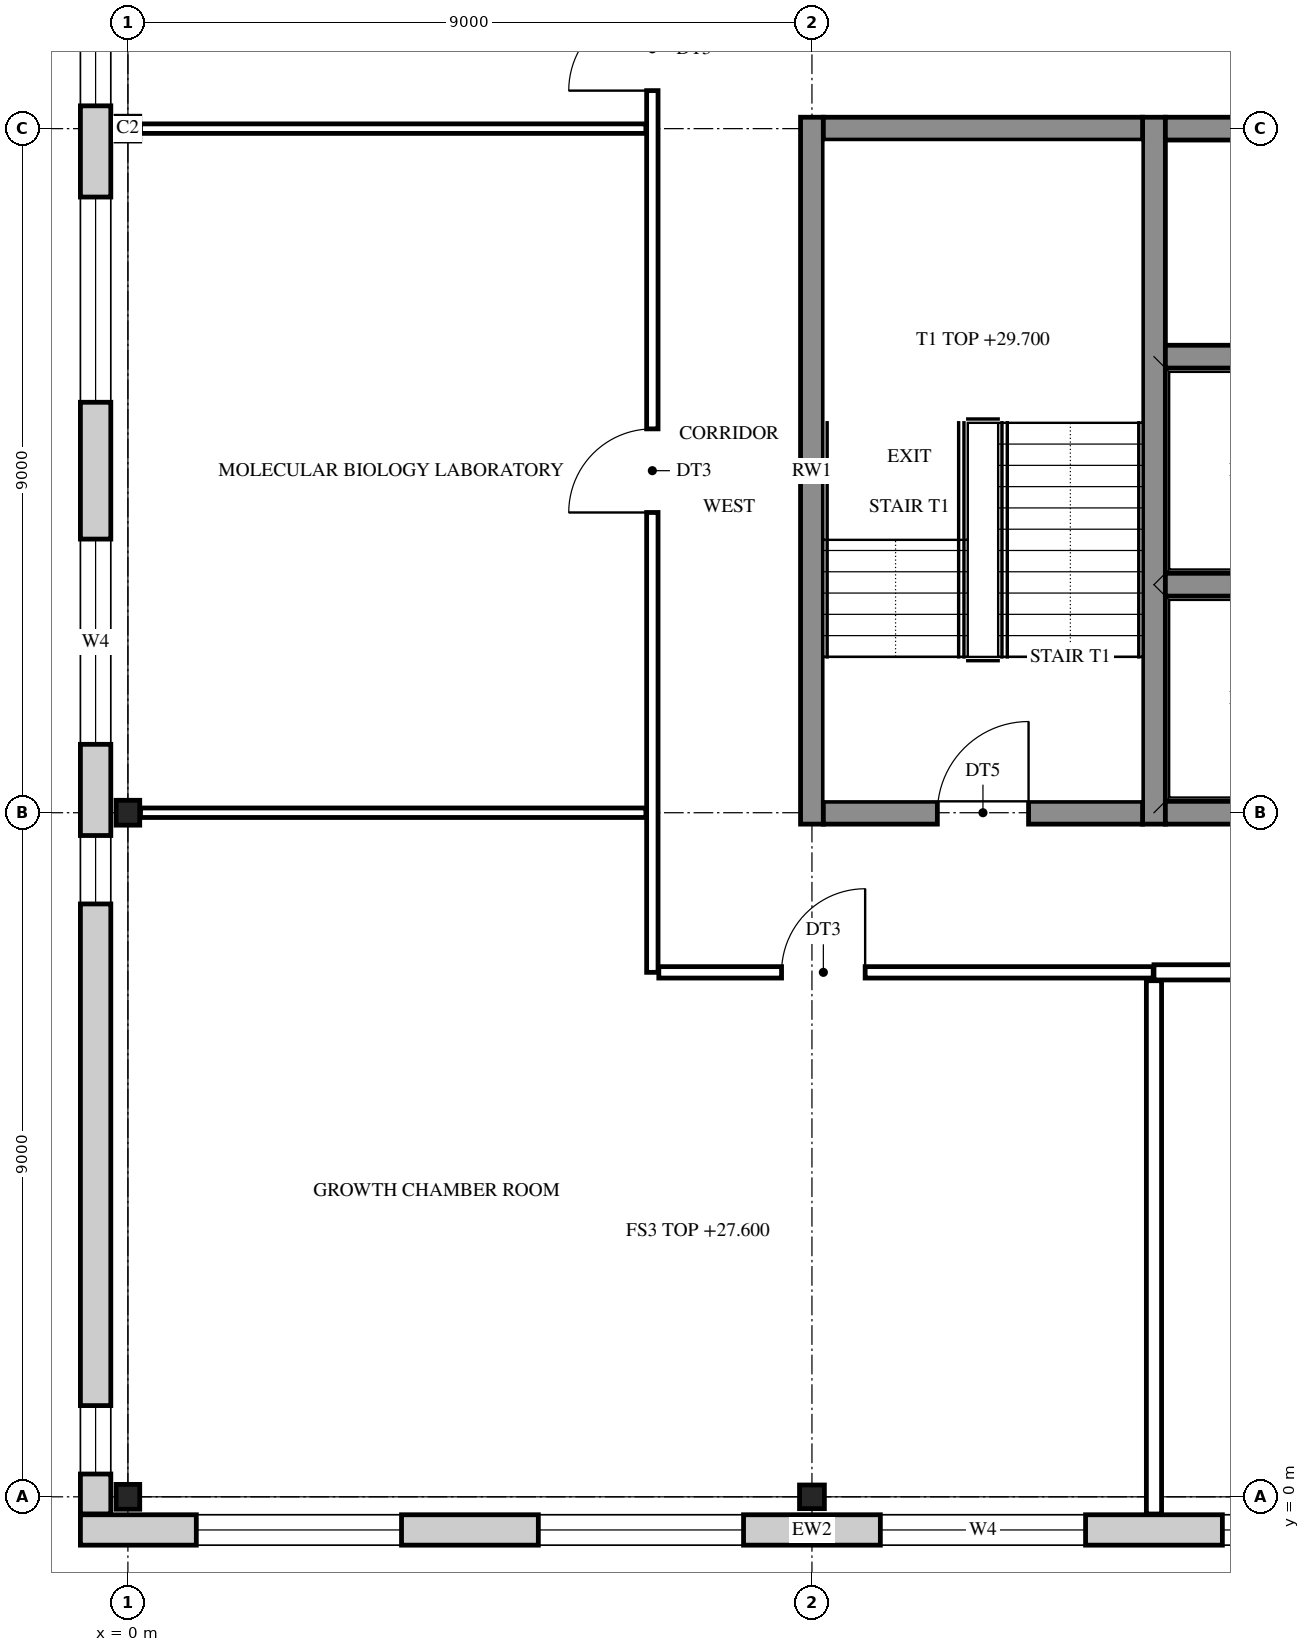
"""IFC4 building model, lengths in metres.
Left out: names, types, materials, properties, quantities, classifications, styles, units other than length and angle.
Written with IfcOpenShell. Run it as: python <this file> out.ifc"""

import sys

from ifc_helpers import new_model, si_unit, direction, frame, frame_2d, origin, origin_2d, place, context, subcontext, project, spatial, rectangle, i_section, extrude, element, fill, save


model = new_model("IFC4")
c1 = context("Model", 3, precision=1e-05, world=origin(), true_north=direction((0.0, 1.0)))
c2 = subcontext(c1, "Body", "Model", "MODEL_VIEW")
j1 = project(units=[si_unit("LENGTHUNIT", "METRE"), si_unit("PLANEANGLEUNIT", "RADIAN")], contexts=[c1])
p1 = place(None, origin())
s1 = spatial("IfcSite", under=j1, at=p1, CompositionType="ELEMENT")
p2 = place(p1, origin())
s2 = spatial("IfcBuilding", under=s1, at=p2, CompositionType="ELEMENT")
p3 = place(p2, frame((0.0, 0.0, 27.6)))
s3 = spatial("IfcBuildingStorey", under=s2, at=p3, CompositionType="ELEMENT", Elevation=27.6)
for number, where, z_axis, x_axis in (
    (1, (0.0, 0.0, 0.0), (0.0, 0.0, 1.0), (1.0, 0.0, 0.0)),
    (2, (0.0, 9.0, 0.0), (0.0, 0.0, 1.0), (1.0, 0.0, 0.0)),
    (3, (0.0, 18.0, 0.0), (0.0, 0.0, 1.0), (1.0, 0.0, 0.0)),
    (4, (9.0, 0.0, 0.0), (0.0, 0.0, 1.0), (0.0, 1.0, 0.0)),
):
    element("IfcColumn", number, at=place(p3, frame(where, z_axis=z_axis, x_axis=x_axis)), inside=s3, PredefinedType="COLUMN", context=c2, shape_type="SweptSolid", body=[
        extrude(i_section(OverallWidth=0.311, OverallDepth=0.327, WebThickness=0.016, FlangeThickness=0.025, FilletRadius=0.017, at=origin_2d()), origin(), (0.0, 0.0, 1.0), 4.2),
    ])
for number, where, z_axis, x_axis in (
    (5, (9.0, 8.85, 0.0), (0.0, 0.0, 1.0), (0.0, 1.0, 0.0)),
    (6, (13.5, 8.85, 0.0), (0.0, 0.0, 1.0), (0.0, 1.0, 0.0)),
):
    element("IfcWall", number, at=place(p3, frame(where, z_axis=z_axis, x_axis=x_axis)), inside=s3, PredefinedType="SHEAR", context=c2, shape_type="SweptSolid", body=[
        extrude(rectangle(XDim=9.3, YDim=0.3, at=frame_2d((4.65, 0.0))), origin(), (0.0, 0.0, 1.0), 4.2),
    ])
p4 = place(p3, frame((9.15, 9.0, 0.0), z_axis=(0.0, 0.0, 1.0), x_axis=(1.0, 0.0, 0.0)))
e7 = element("IfcWall", 7, at=p4, inside=s3, PredefinedType="SHEAR", context=c2, shape_type="SweptSolid", body=[
    extrude(rectangle(XDim=4.2, YDim=0.3, at=frame_2d((2.1, 0.0))), origin(), (0.0, 0.0, 1.0), 4.2),
])
p5 = place(p4, frame((1.5, 0.0, 0.0)))
e8 = element("IfcOpeningElement", 8, at=p5, cuts=e7, PredefinedType="OPENING", context=c2, shape_type="SweptSolid", body=[
    extrude(rectangle(XDim=1.2, YDim=2.1, at=frame_2d((0.6, 1.05))), frame((0.0, 0.16, 0.0), z_axis=(0.0, -1.0, 0.0), x_axis=(1.0, 0.0, 0.0)), (0.0, 0.0, 1.0), 0.32),
])
for number, where, z_axis, x_axis in (
    (9, (13.65, 9.0, 0.0), (0.0, 0.0, 1.0), (1.0, 0.0, 0.0)),
    (10, (13.65, 12.0, 0.0), (0.0, 0.0, 1.0), (1.0, 0.0, 0.0)),
    (11, (13.65, 15.0, 0.0), (0.0, 0.0, 1.0), (1.0, 0.0, 0.0)),
):
    element("IfcWall", number, at=place(p3, frame(where, z_axis=z_axis, x_axis=x_axis)), inside=s3, PredefinedType="SHEAR", context=c2, shape_type="SweptSolid", body=[
        extrude(rectangle(XDim=2.7, YDim=0.3, at=frame_2d((1.35, 0.0))), origin(), (0.0, 0.0, 1.0), 4.2),
    ])
p6 = place(p3, frame((9.15, 18.0, 0.0), z_axis=(0.0, 0.0, 1.0), x_axis=(1.0, 0.0, 0.0)))
e12 = element("IfcWall", 12, at=p6, inside=s3, PredefinedType="SHEAR", context=c2, shape_type="SweptSolid", body=[
    extrude(rectangle(XDim=4.2, YDim=0.3, at=frame_2d((2.1, 0.0))), origin(), (0.0, 0.0, 1.0), 4.2),
])
p7 = place(p3, frame((13.65, 18.0, 0.0), z_axis=(0.0, 0.0, 1.0), x_axis=(1.0, 0.0, 0.0)))
e13 = element("IfcWall", 13, at=p7, inside=s3, PredefinedType="SHEAR", context=c2, shape_type="SweptSolid", body=[
    extrude(rectangle(XDim=2.7, YDim=0.3, at=frame_2d((1.35, 0.0))), origin(), (0.0, 0.0, 1.0), 4.2),
])
p8 = place(p3, frame((32.125, -0.436, 0.0), z_axis=(0.0, 0.0, 1.0), x_axis=(-1.0, 0.0, 0.0)))
e14 = element("IfcWall", 14, at=p8, inside=s3, PredefinedType="STANDARD", context=c2, shape_type="SweptSolid", body=[
    extrude(rectangle(XDim=32.75, YDim=0.4, at=frame_2d((16.375, 0.0))), origin(), (0.0, 0.0, 1.0), 4.2),
])
p9 = place(p8, frame((28.525, 0.0, 0.9)))
e15 = element("IfcOpeningElement", 15, at=p9, cuts=e14, PredefinedType="OPENING", context=c2, shape_type="SweptSolid", body=[
    extrude(rectangle(XDim=2.7, YDim=2.5, at=frame_2d((1.35, 1.25))), frame((0.0, 0.21, 0.0), z_axis=(0.0, -1.0, 0.0), x_axis=(1.0, 0.0, 0.0)), (0.0, 0.0, 1.0), 0.42),
])
p10 = place(p8, frame((24.025, 0.0, 0.9)))
e16 = element("IfcOpeningElement", 16, at=p10, cuts=e14, PredefinedType="OPENING", context=c2, shape_type="SweptSolid", body=[
    extrude(rectangle(XDim=2.7, YDim=2.5, at=frame_2d((1.35, 1.25))), frame((0.0, 0.21, 0.0), z_axis=(0.0, -1.0, 0.0), x_axis=(1.0, 0.0, 0.0)), (0.0, 0.0, 1.0), 0.42),
])
p11 = place(p8, frame((19.525, 0.0, 0.9)))
e17 = element("IfcOpeningElement", 17, at=p11, cuts=e14, PredefinedType="OPENING", context=c2, shape_type="SweptSolid", body=[
    extrude(rectangle(XDim=2.7, YDim=2.5, at=frame_2d((1.35, 1.25))), frame((0.0, 0.21, 0.0), z_axis=(0.0, -1.0, 0.0), x_axis=(1.0, 0.0, 0.0)), (0.0, 0.0, 1.0), 0.42),
])
p12 = place(p8, frame((15.025, 0.0, 0.9)))
e18 = element("IfcOpeningElement", 18, at=p12, cuts=e14, PredefinedType="OPENING", context=c2, shape_type="SweptSolid", body=[
    extrude(rectangle(XDim=2.7, YDim=2.5, at=frame_2d((1.35, 1.25))), frame((0.0, 0.21, 0.0), z_axis=(0.0, -1.0, 0.0), x_axis=(1.0, 0.0, 0.0)), (0.0, 0.0, 1.0), 0.42),
])
p13 = place(p8, frame((10.525, 0.0, 0.9)))
e19 = element("IfcOpeningElement", 19, at=p13, cuts=e14, PredefinedType="OPENING", context=c2, shape_type="SweptSolid", body=[
    extrude(rectangle(XDim=2.7, YDim=2.5, at=frame_2d((1.35, 1.25))), frame((0.0, 0.21, 0.0), z_axis=(0.0, -1.0, 0.0), x_axis=(1.0, 0.0, 0.0)), (0.0, 0.0, 1.0), 0.42),
])
p14 = place(p8, frame((6.025, 0.0, 0.9)))
e20 = element("IfcOpeningElement", 20, at=p14, cuts=e14, PredefinedType="OPENING", context=c2, shape_type="SweptSolid", body=[
    extrude(rectangle(XDim=2.7, YDim=2.5, at=frame_2d((1.35, 1.25))), frame((0.0, 0.21, 0.0), z_axis=(0.0, -1.0, 0.0), x_axis=(1.0, 0.0, 0.0)), (0.0, 0.0, 1.0), 0.42),
])
p15 = place(p8, frame((1.525, 0.0, 0.9)))
e21 = element("IfcOpeningElement", 21, at=p15, cuts=e14, PredefinedType="OPENING", context=c2, shape_type="SweptSolid", body=[
    extrude(rectangle(XDim=2.7, YDim=2.5, at=frame_2d((1.35, 1.25))), frame((0.0, 0.21, 0.0), z_axis=(0.0, -1.0, 0.0), x_axis=(1.0, 0.0, 0.0)), (0.0, 0.0, 1.0), 0.42),
])
p16 = place(p3, frame((-0.425, -0.225, 0.0), z_axis=(0.0, 0.0, 1.0), x_axis=(0.0, 1.0, 0.0)))
e22 = element("IfcWall", 22, at=p16, inside=s3, PredefinedType="STANDARD", context=c2, shape_type="SweptSolid", body=[
    extrude(rectangle(XDim=27.45, YDim=0.4, at=frame_2d((13.725, 0.0))), origin(), (0.0, 0.0, 1.0), 4.2),
])
p17 = place(p16, frame((0.525, 0.0, 0.9)))
e23 = element("IfcOpeningElement", 23, at=p17, cuts=e22, PredefinedType="OPENING", context=c2, shape_type="SweptSolid", body=[
    extrude(rectangle(XDim=0.9, YDim=2.0, at=frame_2d((0.45, 1.0))), frame((0.0, 0.21, 0.0), z_axis=(0.0, -1.0, 0.0), x_axis=(1.0, 0.0, 0.0)), (0.0, 0.0, 1.0), 0.42),
])
p18 = place(p16, frame((8.025, 0.0, 0.9)))
e24 = element("IfcOpeningElement", 24, at=p18, cuts=e22, PredefinedType="OPENING", context=c2, shape_type="SweptSolid", body=[
    extrude(rectangle(XDim=0.9, YDim=2.0, at=frame_2d((0.45, 1.0))), frame((0.0, 0.21, 0.0), z_axis=(0.0, -1.0, 0.0), x_axis=(1.0, 0.0, 0.0)), (0.0, 0.0, 1.0), 0.42),
])
p19 = place(p16, frame((10.125, 0.0, 0.9)))
e25 = element("IfcOpeningElement", 25, at=p19, cuts=e22, PredefinedType="OPENING", context=c2, shape_type="SweptSolid", body=[
    extrude(rectangle(XDim=2.7, YDim=2.5, at=frame_2d((1.35, 1.25))), frame((0.0, 0.21, 0.0), z_axis=(0.0, -1.0, 0.0), x_axis=(1.0, 0.0, 0.0)), (0.0, 0.0, 1.0), 0.42),
])
p20 = place(p16, frame((14.625, 0.0, 0.9)))
e26 = element("IfcOpeningElement", 26, at=p20, cuts=e22, PredefinedType="OPENING", context=c2, shape_type="SweptSolid", body=[
    extrude(rectangle(XDim=2.7, YDim=2.5, at=frame_2d((1.35, 1.25))), frame((0.0, 0.21, 0.0), z_axis=(0.0, -1.0, 0.0), x_axis=(1.0, 0.0, 0.0)), (0.0, 0.0, 1.0), 0.42),
])
p21 = place(p16, frame((18.525, 0.0, 0.9)))
e27 = element("IfcOpeningElement", 27, at=p21, cuts=e22, PredefinedType="OPENING", context=c2, shape_type="SweptSolid", body=[
    extrude(rectangle(XDim=0.9, YDim=2.0, at=frame_2d((0.45, 1.0))), frame((0.0, 0.21, 0.0), z_axis=(0.0, -1.0, 0.0), x_axis=(1.0, 0.0, 0.0)), (0.0, 0.0, 1.0), 0.42),
])
p22 = place(p16, frame((26.025, 0.0, 0.9)))
e28 = element("IfcOpeningElement", 28, at=p22, cuts=e22, PredefinedType="OPENING", context=c2, shape_type="SweptSolid", body=[
    extrude(rectangle(XDim=0.9, YDim=2.0, at=frame_2d((0.45, 1.0))), frame((0.0, 0.21, 0.0), z_axis=(0.0, -1.0, 0.0), x_axis=(1.0, 0.0, 0.0)), (0.0, 0.0, 1.0), 0.42),
])
p23 = place(p3, frame((6.9, 6.9, 0.0), z_axis=(0.0, 0.0, 1.0), x_axis=(0.0, 1.0, 0.0)))
e29 = element("IfcWall", 29, at=p23, inside=s3, PredefinedType="PARTITIONING", context=c2, shape_type="SweptSolid", body=[
    extrude(rectangle(XDim=13.115, YDim=0.15, at=frame_2d((6.558, 0.0))), origin(), (0.0, 0.0, 1.0), 3.537),
])
p24 = place(p23, frame((11.6, 0.0, 0.0)))
e30 = element("IfcOpeningElement", 30, at=p24, cuts=e29, PredefinedType="OPENING", context=c2, shape_type="SweptSolid", body=[
    extrude(rectangle(XDim=1.1, YDim=2.1, at=frame_2d((0.55, 1.05))), frame((0.0, 0.085, 0.0), z_axis=(0.0, -1.0, 0.0), x_axis=(1.0, 0.0, 0.0)), (0.0, 0.0, 1.0), 0.17),
])
p25 = place(p23, frame((6.05, 0.0, 0.0)))
e31 = element("IfcOpeningElement", 31, at=p25, cuts=e29, PredefinedType="OPENING", context=c2, shape_type="SweptSolid", body=[
    extrude(rectangle(XDim=1.1, YDim=2.1, at=frame_2d((0.55, 1.05))), frame((0.0, 0.085, 0.0), z_axis=(0.0, -1.0, 0.0), x_axis=(1.0, 0.0, 0.0)), (0.0, 0.0, 1.0), 0.17),
])
p26 = place(p3, frame((13.5, -0.226, 0.0), z_axis=(0.0, 0.0, 1.0), x_axis=(0.0, 1.0, 0.0)))
e32 = element("IfcWall", 32, at=p26, inside=s3, PredefinedType="PARTITIONING", context=c2, shape_type="SweptSolid", body=[
    extrude(rectangle(XDim=7.016, YDim=0.2, at=frame_2d((3.508, 0.0))), origin(), (0.0, 0.0, 1.0), 3.537),
])
p27 = place(p3, frame((6.985, 6.9, 0.0), z_axis=(0.0, 0.0, 1.0), x_axis=(1.0, 0.0, 0.0)))
e33 = element("IfcWall", 33, at=p27, inside=s3, PredefinedType="PARTITIONING", context=c2, shape_type="SweptSolid", body=[
    extrude(rectangle(XDim=6.505, YDim=0.15, at=frame_2d((3.252, 0.0))), origin(), (0.0, 0.0, 1.0), 3.537),
])
p28 = place(p27, frame((1.615, 0.0, 0.0)))
e34 = element("IfcOpeningElement", 34, at=p28, cuts=e33, PredefinedType="OPENING", context=c2, shape_type="SweptSolid", body=[
    extrude(rectangle(XDim=1.1, YDim=2.1, at=frame_2d((0.55, 1.05))), frame((0.0, 0.085, 0.0), z_axis=(0.0, -1.0, 0.0), x_axis=(1.0, 0.0, 0.0)), (0.0, 0.0, 1.0), 0.17),
])
p29 = place(p3, frame((13.5, 6.9, 0.0), z_axis=(0.0, 0.0, 1.0), x_axis=(1.0, 0.0, 0.0)))
e35 = element("IfcWall", 35, at=p29, inside=s3, PredefinedType="PARTITIONING", context=c2, shape_type="SweptSolid", body=[
    extrude(rectangle(XDim=13.5, YDim=0.2, at=frame_2d((6.75, 0.0))), origin(), (0.0, 0.0, 1.0), 3.537),
])
p30 = place(p29, frame((7.45, 0.0, 0.0)))
e36 = element("IfcOpeningElement", 36, at=p30, cuts=e35, PredefinedType="OPENING", context=c2, shape_type="SweptSolid", body=[
    extrude(rectangle(XDim=1.0, YDim=2.1, at=frame_2d((0.5, 1.05))), frame((0.0, 0.11, 0.0), z_axis=(0.0, -1.0, 0.0), x_axis=(1.0, 0.0, 0.0)), (0.0, 0.0, 1.0), 0.22),
])
for number, where, z_axis, x_axis in (
    (37, (0.166, 9.0, 0.0), (0.0, 0.0, 1.0), (1.0, 0.0, 0.0)),
    (38, (0.166, 18.0, 0.0), (0.0, 0.0, 1.0), (1.0, 0.0, 0.0)),
):
    element("IfcWall", number, at=place(p3, frame(where, z_axis=z_axis, x_axis=x_axis)), inside=s3, PredefinedType="PARTITIONING", context=c2, shape_type="SweptSolid", body=[
        extrude(rectangle(XDim=6.649, YDim=0.125, at=frame_2d((3.325, 0.0))), origin(), (0.0, 0.0, 1.0), 3.537),
    ])
p31 = place(p9, origin())
e39 = element("IfcWindow", 39, at=p31, inside=s3, PartitioningType="SINGLE_PANEL", PredefinedType="WINDOW", context=c2, shape_type="SweptSolid", body=[
    extrude(rectangle(XDim=2.7, YDim=2.5, at=frame_2d((1.35, 1.25))), frame((0.0, 0.03, 0.0), z_axis=(0.0, -1.0, 0.0), x_axis=(1.0, 0.0, 0.0)), (0.0, 0.0, 1.0), 0.06),
])
fill(e15, e39)
p32 = place(p10, origin())
e40 = element("IfcWindow", 40, at=p32, inside=s3, PartitioningType="SINGLE_PANEL", PredefinedType="WINDOW", context=c2, shape_type="SweptSolid", body=[
    extrude(rectangle(XDim=2.7, YDim=2.5, at=frame_2d((1.35, 1.25))), frame((0.0, 0.03, 0.0), z_axis=(0.0, -1.0, 0.0), x_axis=(1.0, 0.0, 0.0)), (0.0, 0.0, 1.0), 0.06),
])
fill(e16, e40)
p33 = place(p11, origin())
e41 = element("IfcWindow", 41, at=p33, inside=s3, PartitioningType="SINGLE_PANEL", PredefinedType="WINDOW", context=c2, shape_type="SweptSolid", body=[
    extrude(rectangle(XDim=2.7, YDim=2.5, at=frame_2d((1.35, 1.25))), frame((0.0, 0.03, 0.0), z_axis=(0.0, -1.0, 0.0), x_axis=(1.0, 0.0, 0.0)), (0.0, 0.0, 1.0), 0.06),
])
fill(e17, e41)
p34 = place(p12, origin())
e42 = element("IfcWindow", 42, at=p34, inside=s3, PartitioningType="SINGLE_PANEL", PredefinedType="WINDOW", context=c2, shape_type="SweptSolid", body=[
    extrude(rectangle(XDim=2.7, YDim=2.5, at=frame_2d((1.35, 1.25))), frame((0.0, 0.03, 0.0), z_axis=(0.0, -1.0, 0.0), x_axis=(1.0, 0.0, 0.0)), (0.0, 0.0, 1.0), 0.06),
])
fill(e18, e42)
p35 = place(p17, origin())
e43 = element("IfcWindow", 43, at=p35, inside=s3, PartitioningType="SINGLE_PANEL", PredefinedType="WINDOW", context=c2, shape_type="SweptSolid", body=[
    extrude(rectangle(XDim=0.9, YDim=2.0, at=frame_2d((0.45, 1.0))), frame((0.0, 0.03, 0.0), z_axis=(0.0, -1.0, 0.0), x_axis=(1.0, 0.0, 0.0)), (0.0, 0.0, 1.0), 0.06),
])
fill(e23, e43)
p36 = place(p18, origin())
e44 = element("IfcWindow", 44, at=p36, inside=s3, PartitioningType="SINGLE_PANEL", PredefinedType="WINDOW", context=c2, shape_type="SweptSolid", body=[
    extrude(rectangle(XDim=0.9, YDim=2.0, at=frame_2d((0.45, 1.0))), frame((0.0, 0.03, 0.0), z_axis=(0.0, -1.0, 0.0), x_axis=(1.0, 0.0, 0.0)), (0.0, 0.0, 1.0), 0.06),
])
fill(e24, e44)
p37 = place(p19, origin())
e45 = element("IfcWindow", 45, at=p37, inside=s3, PartitioningType="SINGLE_PANEL", PredefinedType="WINDOW", context=c2, shape_type="SweptSolid", body=[
    extrude(rectangle(XDim=2.7, YDim=2.5, at=frame_2d((1.35, 1.25))), frame((0.0, 0.03, 0.0), z_axis=(0.0, -1.0, 0.0), x_axis=(1.0, 0.0, 0.0)), (0.0, 0.0, 1.0), 0.06),
])
fill(e25, e45)
p38 = place(p20, origin())
e46 = element("IfcWindow", 46, at=p38, inside=s3, PartitioningType="SINGLE_PANEL", PredefinedType="WINDOW", context=c2, shape_type="SweptSolid", body=[
    extrude(rectangle(XDim=2.7, YDim=2.5, at=frame_2d((1.35, 1.25))), frame((0.0, 0.03, 0.0), z_axis=(0.0, -1.0, 0.0), x_axis=(1.0, 0.0, 0.0)), (0.0, 0.0, 1.0), 0.06),
])
fill(e26, e46)
p39 = place(p21, origin())
e47 = element("IfcWindow", 47, at=p39, inside=s3, PartitioningType="SINGLE_PANEL", PredefinedType="WINDOW", context=c2, shape_type="SweptSolid", body=[
    extrude(rectangle(XDim=0.9, YDim=2.0, at=frame_2d((0.45, 1.0))), frame((0.0, 0.03, 0.0), z_axis=(0.0, -1.0, 0.0), x_axis=(1.0, 0.0, 0.0)), (0.0, 0.0, 1.0), 0.06),
])
fill(e27, e47)
p40 = place(p5, origin())
e48 = element("IfcDoor", 48, at=p40, inside=s3, OperationType="SINGLE_SWING_RIGHT", PredefinedType="DOOR", context=c2, shape_type="SweptSolid", body=[
    extrude(rectangle(XDim=1.2, YDim=2.1, at=frame_2d((0.6, 1.05))), frame((0.0, 0.025, 0.0), z_axis=(0.0, -1.0, 0.0), x_axis=(1.0, 0.0, 0.0)), (0.0, 0.0, 1.0), 0.05),
])
fill(e8, e48)
p41 = place(p28, frame((1.1, 0.0, 0.0), z_axis=(0.0, 0.0, 1.0), x_axis=(-1.0, 0.0, 0.0)))
e49 = element("IfcDoor", 49, at=p41, inside=s3, OperationType="SINGLE_SWING_RIGHT", PredefinedType="DOOR", context=c2, shape_type="SweptSolid", body=[
    extrude(rectangle(XDim=1.1, YDim=2.1, at=frame_2d((0.55, 1.05))), frame((0.0, 0.025, 0.0), z_axis=(0.0, -1.0, 0.0), x_axis=(1.0, 0.0, 0.0)), (0.0, 0.0, 1.0), 0.05),
])
fill(e34, e49)
p42 = place(p24, origin())
e50 = element("IfcDoor", 50, at=p42, inside=s3, OperationType="SINGLE_SWING_LEFT", PredefinedType="DOOR", context=c2, shape_type="SweptSolid", body=[
    extrude(rectangle(XDim=1.1, YDim=2.1, at=frame_2d((0.55, 1.05))), frame((0.0, 0.025, 0.0), z_axis=(0.0, -1.0, 0.0), x_axis=(1.0, 0.0, 0.0)), (0.0, 0.0, 1.0), 0.05),
])
fill(e30, e50)
p43 = place(p25, origin())
e51 = element("IfcDoor", 51, at=p43, inside=s3, OperationType="SINGLE_SWING_LEFT", PredefinedType="DOOR", context=c2, shape_type="SweptSolid", body=[
    extrude(rectangle(XDim=1.1, YDim=2.1, at=frame_2d((0.55, 1.05))), frame((0.0, 0.025, 0.0), z_axis=(0.0, -1.0, 0.0), x_axis=(1.0, 0.0, 0.0)), (0.0, 0.0, 1.0), 0.05),
])
fill(e31, e51)
save(model, sys.argv[1])
